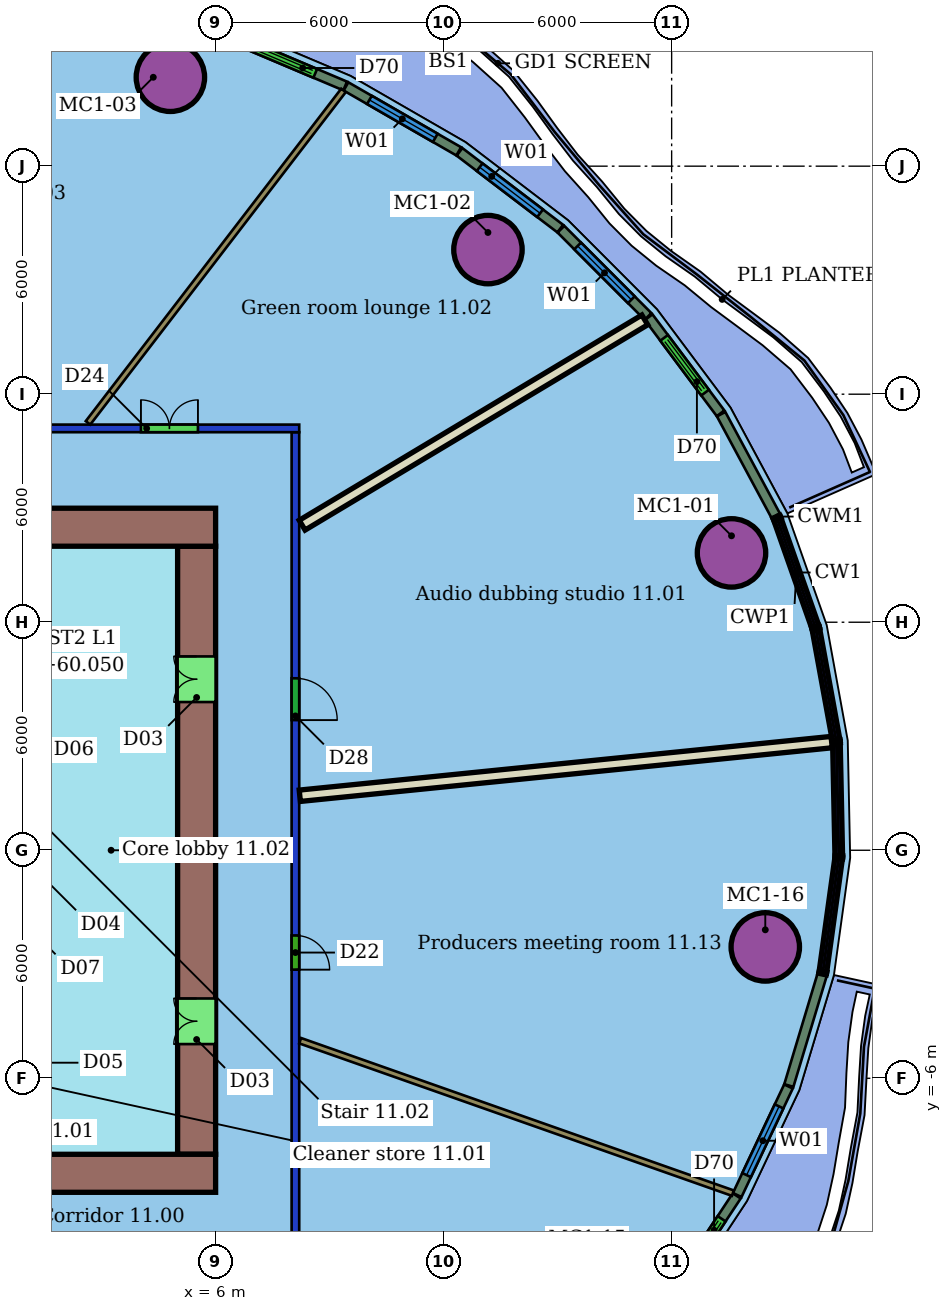
"""IFC4 building model, lengths in metres.
Left out: names, types, materials, properties, quantities, classifications, styles, units other than length and angle.
Written with IfcOpenShell. Run it as: python <this file> out.ifc"""

import sys

from ifc_helpers import new_model, si_unit, direction, frame, frame_2d, origin, origin_2d, place, context, subcontext, project, spatial, rectangle, hollow_circle, extrude, element, fill, save


model = new_model("IFC4")
c1 = context("Model", 3, precision=1e-05, world=origin(), true_north=direction((0.0, 1.0)))
c2 = subcontext(c1, "Body", "Model", "MODEL_VIEW")
j1 = project(units=[si_unit("LENGTHUNIT", "METRE"), si_unit("PLANEANGLEUNIT", "RADIAN")], contexts=[c1])
p1 = place(None, origin())
s1 = spatial("IfcSite", under=j1, at=p1, CompositionType="ELEMENT")
p2 = place(p1, origin())
s2 = spatial("IfcBuilding", under=s1, at=p2, CompositionType="ELEMENT")
p3 = place(p2, frame((0.0, 0.0, 58.2)))
s3 = spatial("IfcBuildingStorey", under=s2, at=p3, CompositionType="ELEMENT", Elevation=58.2)
for number, where, z_axis, x_axis in (
    (1, (19.575, 7.824, 0.0), (0.0, 0.0, 1.0), (1.0, 0.0, 0.0)),
    (2, (13.166, 15.805, 0.0), (0.0, 0.0, 1.0), (1.0, 0.0, 0.0)),
    (3, (4.81, 20.339, 0.0), (0.0, 0.0, 1.0), (1.0, 0.0, 0.0)),
    (4, (20.464, -2.543, 0.0), (0.0, 0.0, 1.0), (1.0, 0.0, 0.0)),
):
    element("IfcColumn", number, at=place(p3, frame(where, z_axis=z_axis, x_axis=x_axis)), inside=s3, PredefinedType="COLUMN", context=c2, shape_type="SweptSolid", body=[
        extrude(hollow_circle(Radius=0.9, WallThickness=0.06, at=origin_2d()), origin(), (0.0, 0.0, 1.0), 3.55),
    ])
p4 = place(p3, frame((-20.2, 11.1, 0.0), z_axis=(0.0, 0.0, 1.0), x_axis=(1.0, 0.0, 0.0)))
e5 = element("IfcWall", 5, at=p4, inside=s3, PredefinedType="PARTITIONING", context=c2, shape_type="SweptSolid", body=[
    extrude(rectangle(XDim=28.4, YDim=0.2, at=frame_2d((14.2, 0.0))), origin(), (0.0, 0.0, 1.0), 2.85),
])
p5 = place(p4, frame((24.235, 0.0, 0.0)))
e6 = element("IfcOpeningElement", 6, at=p5, cuts=e5, PredefinedType="OPENING", context=c2, shape_type="SweptSolid", body=[
    extrude(rectangle(XDim=1.5, YDim=2.1, at=frame_2d((0.75, 1.05))), frame((0.0, 0.11, 0.0), z_axis=(0.0, -1.0, 0.0), x_axis=(1.0, 0.0, 0.0)), (0.0, 0.0, 1.0), 0.22),
])
p6 = place(p4, frame((18.986, 0.0, 0.0)))
e7 = element("IfcOpeningElement", 7, at=p6, cuts=e5, PredefinedType="OPENING", context=c2, shape_type="SweptSolid", body=[
    extrude(rectangle(XDim=1.0, YDim=2.1, at=frame_2d((0.5, 1.05))), frame((0.0, 0.11, 0.0), z_axis=(0.0, -1.0, 0.0), x_axis=(1.0, 0.0, 0.0)), (0.0, 0.0, 1.0), 0.22),
])
p7 = place(p4, frame((10.215, 0.0, 0.0)))
e8 = element("IfcOpeningElement", 8, at=p7, cuts=e5, PredefinedType="OPENING", context=c2, shape_type="SweptSolid", body=[
    extrude(rectangle(XDim=1.2, YDim=2.1, at=frame_2d((0.6, 1.05))), frame((0.0, 0.11, 0.0), z_axis=(0.0, -1.0, 0.0), x_axis=(1.0, 0.0, 0.0)), (0.0, 0.0, 1.0), 0.22),
])
p8 = place(p4, frame((5.94, 0.0, 0.0)))
e9 = element("IfcOpeningElement", 9, at=p8, cuts=e5, PredefinedType="OPENING", context=c2, shape_type="SweptSolid", body=[
    extrude(rectangle(XDim=1.0, YDim=2.1, at=frame_2d((0.5, 1.05))), frame((0.0, 0.11, 0.0), z_axis=(0.0, -1.0, 0.0), x_axis=(1.0, 0.0, 0.0)), (0.0, 0.0, 1.0), 0.22),
])
p9 = place(p3, frame((8.1, 11.0, 0.0), z_axis=(0.0, 0.0, 1.0), x_axis=(0.0, -1.0, 0.0)))
e10 = element("IfcWall", 10, at=p9, inside=s3, PredefinedType="PARTITIONING", context=c2, shape_type="SweptSolid", body=[
    extrude(rectangle(XDim=22.0, YDim=0.2, at=frame_2d((11.0, 0.0))), origin(), (0.0, 0.0, 1.0), 2.85),
])
p10 = place(p9, frame((6.475, 0.0, 0.0)))
e11 = element("IfcOpeningElement", 11, at=p10, cuts=e10, PredefinedType="OPENING", context=c2, shape_type="SweptSolid", body=[
    extrude(rectangle(XDim=1.1, YDim=2.1, at=frame_2d((0.55, 1.05))), frame((0.0, 0.11, 0.0), z_axis=(0.0, -1.0, 0.0), x_axis=(1.0, 0.0, 0.0)), (0.0, 0.0, 1.0), 0.22),
])
p11 = place(p9, frame((13.242, 0.0, 0.0)))
e12 = element("IfcOpeningElement", 12, at=p11, cuts=e10, PredefinedType="OPENING", context=c2, shape_type="SweptSolid", body=[
    extrude(rectangle(XDim=0.9, YDim=2.1, at=frame_2d((0.45, 1.05))), frame((0.0, 0.11, 0.0), z_axis=(0.0, -1.0, 0.0), x_axis=(1.0, 0.0, 0.0)), (0.0, 0.0, 1.0), 0.22),
])
p12 = place(p3, frame((22.211, 2.846, 0.0), z_axis=(0.0, 0.0, 1.0), x_axis=(-0.994950554793, -0.10036629672, 0.0)))
e13 = element("IfcWall", 13, at=p12, inside=s3, PredefinedType="PARTITIONING", context=c2, shape_type="SweptSolid", body=[
    extrude(rectangle(XDim=14.067, YDim=0.3, at=frame_2d((7.034, 0.0))), origin(), (0.0, 0.0, 1.0), 3.55),
])
p13 = place(p3, frame((17.293, 13.955, 0.0), z_axis=(0.0, 0.0, 1.0), x_axis=(-0.857841161712, -0.513914916375, 0.0)))
e14 = element("IfcWall", 14, at=p13, inside=s3, PredefinedType="PARTITIONING", context=c2, shape_type="SweptSolid", body=[
    extrude(rectangle(XDim=10.51, YDim=0.3, at=frame_2d((5.255, 0.0))), origin(), (0.0, 0.0, 1.0), 3.55),
])
p14 = place(p3, frame((9.365, 19.993, 0.0), z_axis=(0.0, 0.0, 1.0), x_axis=(-0.609349200428, -0.792901981293, 0.0)))
e15 = element("IfcWall", 15, at=p14, inside=s3, PredefinedType="PARTITIONING", context=c2, shape_type="SweptSolid", body=[
    extrude(rectangle(XDim=11.032, YDim=0.15, at=frame_2d((5.516, 0.0))), origin(), (0.0, 0.0, 1.0), 3.55),
])
p15 = place(p3, frame((19.611, -9.022, 0.0), z_axis=(0.0, 0.0, 1.0), x_axis=(-0.943187678435, 0.332260444904, 0.0)))
e16 = element("IfcWall", 16, at=p15, inside=s3, PredefinedType="PARTITIONING", context=c2, shape_type="SweptSolid", body=[
    extrude(rectangle(XDim=12.072, YDim=0.15, at=frame_2d((6.036, 0.0))), origin(), (0.0, 0.0, 1.0), 3.55),
])
p16 = place(p3, frame((20.745, 8.79, 0.0), z_axis=(0.0, 0.0, 1.0), x_axis=(-0.473545649415, 0.880769276213, 0.0)))
e17 = element("IfcWall", 17, at=p16, inside=s3, PredefinedType="SOLIDWALL", context=c2, shape_type="SweptSolid", body=[
    extrude(rectangle(XDim=3.048, YDim=0.25, at=frame_2d((1.524, 0.0))), origin(), (0.0, 0.0, 1.0), 3.15),
])
p17 = place(p3, frame((19.288, 11.497, 0.0), z_axis=(0.0, 0.0, 1.0), x_axis=(-0.59907224047, 0.800694979813, 0.0)))
e18 = element("IfcWall", 18, at=p17, inside=s3, PredefinedType="SOLIDWALL", context=c2, shape_type="SweptSolid", body=[
    extrude(rectangle(XDim=3.159, YDim=0.25, at=frame_2d((1.58, 0.0))), origin(), (0.0, 0.0, 1.0), 3.15),
])
p18 = place(p17, frame((0.68, 0.0, 0.0)))
e19 = element("IfcOpeningElement", 19, at=p18, cuts=e18, PredefinedType="OPENING", context=c2, shape_type="SweptSolid", body=[
    extrude(rectangle(XDim=1.8, YDim=2.4, at=frame_2d((0.9, 1.2))), frame((0.0, 0.135, 0.0), z_axis=(0.0, -1.0, 0.0), x_axis=(1.0, 0.0, 0.0)), (0.0, 0.0, 1.0), 0.27),
])
p19 = place(p3, frame((17.378, 14.046, 0.0), z_axis=(0.0, 0.0, 1.0), x_axis=(-0.706541864319, 0.707671247095, 0.0)))
e20 = element("IfcWall", 20, at=p19, inside=s3, PredefinedType="SOLIDWALL", context=c2, shape_type="SweptSolid", body=[
    extrude(rectangle(XDim=3.243, YDim=0.25, at=frame_2d((1.621, 0.0))), origin(), (0.0, 0.0, 1.0), 3.15),
])
p20 = place(p19, frame((0.621, 0.0, 0.8)))
e21 = element("IfcOpeningElement", 21, at=p20, cuts=e20, PredefinedType="OPENING", context=c2, shape_type="SweptSolid", body=[
    extrude(rectangle(XDim=2.0, YDim=2.2, at=frame_2d((1.0, 1.1))), frame((0.0, 0.135, 0.0), z_axis=(0.0, -1.0, 0.0), x_axis=(1.0, 0.0, 0.0)), (0.0, 0.0, 1.0), 0.27),
])
p21 = place(p3, frame((15.069, 16.357, 0.0), z_axis=(0.0, 0.0, 1.0), x_axis=(-0.795504012695, 0.605948319402, 0.0)))
e22 = element("IfcWall", 22, at=p21, inside=s3, PredefinedType="SOLIDWALL", context=c2, shape_type="SweptSolid", body=[
    extrude(rectangle(XDim=3.333, YDim=0.25, at=frame_2d((1.667, 0.0))), origin(), (0.0, 0.0, 1.0), 3.15),
])
p22 = place(p21, frame((0.667, 0.0, 0.8)))
e23 = element("IfcOpeningElement", 23, at=p22, cuts=e22, PredefinedType="OPENING", context=c2, shape_type="SweptSolid", body=[
    extrude(rectangle(XDim=2.0, YDim=2.2, at=frame_2d((1.0, 1.1))), frame((0.0, 0.135, 0.0), z_axis=(0.0, -1.0, 0.0), x_axis=(1.0, 0.0, 0.0)), (0.0, 0.0, 1.0), 0.27),
])
p23 = place(p3, frame((12.397, 18.39, 0.0), z_axis=(0.0, 0.0, 1.0), x_axis=(-0.866535553406, 0.499115352081, 0.0)))
e24 = element("IfcWall", 24, at=p23, inside=s3, PredefinedType="SOLIDWALL", context=c2, shape_type="SweptSolid", body=[
    extrude(rectangle(XDim=3.424, YDim=0.25, at=frame_2d((1.712, 0.0))), origin(), (0.0, 0.0, 1.0), 3.15),
])
p24 = place(p23, frame((0.712, 0.0, 0.8)))
e25 = element("IfcOpeningElement", 25, at=p24, cuts=e24, PredefinedType="OPENING", context=c2, shape_type="SweptSolid", body=[
    extrude(rectangle(XDim=2.0, YDim=2.2, at=frame_2d((1.0, 1.1))), frame((0.0, 0.135, 0.0), z_axis=(0.0, -1.0, 0.0), x_axis=(1.0, 0.0, 0.0)), (0.0, 0.0, 1.0), 0.27),
])
p25 = place(p3, frame((9.409, 20.109, 0.0), z_axis=(0.0, 0.0, 1.0), x_axis=(-0.920920201112, 0.389751181119, 0.0)))
e26 = element("IfcWall", 26, at=p25, inside=s3, PredefinedType="SOLIDWALL", context=c2, shape_type="SweptSolid", body=[
    extrude(rectangle(XDim=3.51, YDim=0.25, at=frame_2d((1.755, 0.0))), origin(), (0.0, 0.0, 1.0), 3.15),
])
p26 = place(p25, frame((0.855, 0.0, 0.0)))
e27 = element("IfcOpeningElement", 27, at=p26, cuts=e26, PredefinedType="OPENING", context=c2, shape_type="SweptSolid", body=[
    extrude(rectangle(XDim=1.8, YDim=2.4, at=frame_2d((0.9, 1.2))), frame((0.0, 0.135, 0.0), z_axis=(0.0, -1.0, 0.0), x_axis=(1.0, 0.0, 0.0)), (0.0, 0.0, 1.0), 0.27),
])
p27 = place(p3, frame((17.926, -11.8, 0.0), z_axis=(0.0, 0.0, 1.0), x_axis=(0.550976461362, 0.834520784058, 0.0)))
e28 = element("IfcWall", 28, at=p27, inside=s3, PredefinedType="SOLIDWALL", context=c2, shape_type="SweptSolid", body=[
    extrude(rectangle(XDim=3.243, YDim=0.25, at=frame_2d((1.621, 0.0))), origin(), (0.0, 0.0, 1.0), 3.15),
])
p28 = place(p27, frame((0.721, 0.0, 0.0)))
e29 = element("IfcOpeningElement", 29, at=p28, cuts=e28, PredefinedType="OPENING", context=c2, shape_type="SweptSolid", body=[
    extrude(rectangle(XDim=1.8, YDim=2.4, at=frame_2d((0.9, 1.2))), frame((0.0, 0.135, 0.0), z_axis=(0.0, -1.0, 0.0), x_axis=(1.0, 0.0, 0.0)), (0.0, 0.0, 1.0), 0.27),
])
p29 = place(p3, frame((19.725, -9.072, 0.0), z_axis=(0.0, 0.0, 1.0), x_axis=(0.427069496555, 0.904218803781, 0.0)))
e30 = element("IfcWall", 30, at=p29, inside=s3, PredefinedType="SOLIDWALL", context=c2, shape_type="SweptSolid", body=[
    extrude(rectangle(XDim=3.159, YDim=0.25, at=frame_2d((1.58, 0.0))), origin(), (0.0, 0.0, 1.0), 3.15),
])
p30 = place(p29, frame((0.58, 0.0, 0.8)))
e31 = element("IfcOpeningElement", 31, at=p30, cuts=e30, PredefinedType="OPENING", context=c2, shape_type="SweptSolid", body=[
    extrude(rectangle(XDim=2.0, YDim=2.2, at=frame_2d((1.0, 1.1))), frame((0.0, 0.135, 0.0), z_axis=(0.0, -1.0, 0.0), x_axis=(1.0, 0.0, 0.0)), (0.0, 0.0, 1.0), 0.27),
])
p31 = place(p3, frame((21.084, -6.19, 0.0), z_axis=(0.0, 0.0, 1.0), x_axis=(0.28804594388, 0.957616590403, 0.0)))
e32 = element("IfcWall", 32, at=p31, inside=s3, PredefinedType="SOLIDWALL", context=c2, shape_type="SweptSolid", body=[
    extrude(rectangle(XDim=3.048, YDim=0.25, at=frame_2d((1.524, 0.0))), origin(), (0.0, 0.0, 1.0), 3.15),
])
p32 = place(p3, frame((6.0, 8.5, 0.0), z_axis=(0.0, 0.0, 1.0), x_axis=(-1.0, 0.0, 0.0)))
e33 = element("IfcWall", 33, at=p32, inside=s3, PredefinedType="SHEAR", context=c2, shape_type="SweptSolid", body=[
    extrude(rectangle(XDim=12.0, YDim=1.0, at=frame_2d((6.0, 0.0))), origin(), (0.0, 0.0, 1.0), 3.4),
])
p33 = place(p32, frame((5.6, 0.0, 0.0)))
e34 = element("IfcOpeningElement", 34, at=p33, cuts=e33, PredefinedType="OPENING", context=c2, shape_type="SweptSolid", body=[
    extrude(rectangle(XDim=1.2, YDim=2.1, at=frame_2d((0.6, 1.05))), frame((0.0, 0.51, 0.0), z_axis=(0.0, -1.0, 0.0), x_axis=(1.0, 0.0, 0.0)), (0.0, 0.0, 1.0), 1.02),
])
p34 = place(p3, frame((-18.0, -8.5, 0.0), z_axis=(0.0, 0.0, 1.0), x_axis=(1.0, 0.0, 0.0)))
e35 = element("IfcWall", 35, at=p34, inside=s3, PredefinedType="SHEAR", context=c2, shape_type="SweptSolid", body=[
    extrude(rectangle(XDim=24.0, YDim=1.0, at=frame_2d((12.0, 0.0))), origin(), (0.0, 0.0, 1.0), 3.4),
])
p35 = place(p34, frame((6.0, 0.0, 0.0)))
e36 = element("IfcOpeningElement", 36, at=p35, cuts=e35, PredefinedType="OPENING", context=c2, shape_type="SweptSolid", body=[
    extrude(rectangle(XDim=1.2, YDim=2.1, at=frame_2d((0.6, 1.05))), frame((0.0, 0.51, 0.0), z_axis=(0.0, -1.0, 0.0), x_axis=(1.0, 0.0, 0.0)), (0.0, 0.0, 1.0), 1.02),
])
p36 = place(p3, frame((5.5, -8.0, 0.0), z_axis=(0.0, 0.0, 1.0), x_axis=(0.0, 1.0, 0.0)))
e37 = element("IfcWall", 37, at=p36, inside=s3, PredefinedType="SHEAR", context=c2, shape_type="SweptSolid", body=[
    extrude(rectangle(XDim=16.0, YDim=1.0, at=frame_2d((8.0, 0.0))), origin(), (0.0, 0.0, 1.0), 3.4),
])
p37 = place(p36, frame((2.9, 0.0, 0.0)))
e38 = element("IfcOpeningElement", 38, at=p37, cuts=e37, PredefinedType="OPENING", context=c2, shape_type="SweptSolid", body=[
    extrude(rectangle(XDim=1.2, YDim=2.1, at=frame_2d((0.6, 1.05))), frame((0.0, 0.51, 0.0), z_axis=(0.0, -1.0, 0.0), x_axis=(1.0, 0.0, 0.0)), (0.0, 0.0, 1.0), 1.02),
])
p38 = place(p36, frame((11.9, 0.0, 0.0)))
e39 = element("IfcOpeningElement", 39, at=p38, cuts=e37, PredefinedType="OPENING", context=c2, shape_type="SweptSolid", body=[
    extrude(rectangle(XDim=1.2, YDim=2.1, at=frame_2d((0.6, 1.05))), frame((0.0, 0.51, 0.0), z_axis=(0.0, -1.0, 0.0), x_axis=(1.0, 0.0, 0.0)), (0.0, 0.0, 1.0), 1.02),
])
p39 = place(p10, origin())
e40 = element("IfcDoor", 40, at=p39, inside=s3, OperationType="SINGLE_SWING_RIGHT", PredefinedType="DOOR", context=c2, shape_type="SweptSolid", body=[
    extrude(rectangle(XDim=1.1, YDim=2.1, at=frame_2d((0.55, 1.05))), frame((0.0, 0.025, 0.0), z_axis=(0.0, -1.0, 0.0), x_axis=(1.0, 0.0, 0.0)), (0.0, 0.0, 1.0), 0.05),
])
fill(e11, e40)
p40 = place(p5, origin())
e41 = element("IfcDoor", 41, at=p40, inside=s3, OperationType="DOUBLE_DOOR_SINGLE_SWING", PredefinedType="DOOR", context=c2, shape_type="SweptSolid", body=[
    extrude(rectangle(XDim=1.5, YDim=2.1, at=frame_2d((0.75, 1.05))), frame((0.0, 0.025, 0.0), z_axis=(0.0, -1.0, 0.0), x_axis=(1.0, 0.0, 0.0)), (0.0, 0.0, 1.0), 0.05),
])
fill(e6, e41)
p41 = place(p11, origin())
e42 = element("IfcDoor", 42, at=p41, inside=s3, OperationType="SINGLE_SWING_RIGHT", PredefinedType="DOOR", context=c2, shape_type="SweptSolid", body=[
    extrude(rectangle(XDim=0.9, YDim=2.1, at=frame_2d((0.45, 1.05))), frame((0.0, 0.025, 0.0), z_axis=(0.0, -1.0, 0.0), x_axis=(1.0, 0.0, 0.0)), (0.0, 0.0, 1.0), 0.05),
])
fill(e12, e42)
p42 = place(p18, origin())
e43 = element("IfcDoor", 43, at=p42, inside=s3, OperationType="DOUBLE_DOOR_SLIDING", PredefinedType="DOOR", context=c2, shape_type="SweptSolid", body=[
    extrude(rectangle(XDim=1.8, YDim=2.4, at=frame_2d((0.9, 1.2))), frame((0.0, 0.025, 0.0), z_axis=(0.0, -1.0, 0.0), x_axis=(1.0, 0.0, 0.0)), (0.0, 0.0, 1.0), 0.05),
])
fill(e19, e43)
p43 = place(p20, origin())
e44 = element("IfcWindow", 44, at=p43, inside=s3, PartitioningType="SINGLE_PANEL", PredefinedType="WINDOW", context=c2, shape_type="SweptSolid", body=[
    extrude(rectangle(XDim=2.0, YDim=2.2, at=frame_2d((1.0, 1.1))), frame((0.0, 0.03, 0.0), z_axis=(0.0, -1.0, 0.0), x_axis=(1.0, 0.0, 0.0)), (0.0, 0.0, 1.0), 0.06),
])
fill(e21, e44)
p44 = place(p22, origin())
e45 = element("IfcWindow", 45, at=p44, inside=s3, PartitioningType="SINGLE_PANEL", PredefinedType="WINDOW", context=c2, shape_type="SweptSolid", body=[
    extrude(rectangle(XDim=2.0, YDim=2.2, at=frame_2d((1.0, 1.1))), frame((0.0, 0.03, 0.0), z_axis=(0.0, -1.0, 0.0), x_axis=(1.0, 0.0, 0.0)), (0.0, 0.0, 1.0), 0.06),
])
fill(e23, e45)
p45 = place(p24, origin())
e46 = element("IfcWindow", 46, at=p45, inside=s3, PartitioningType="SINGLE_PANEL", PredefinedType="WINDOW", context=c2, shape_type="SweptSolid", body=[
    extrude(rectangle(XDim=2.0, YDim=2.2, at=frame_2d((1.0, 1.1))), frame((0.0, 0.03, 0.0), z_axis=(0.0, -1.0, 0.0), x_axis=(1.0, 0.0, 0.0)), (0.0, 0.0, 1.0), 0.06),
])
fill(e25, e46)
p46 = place(p26, origin())
e47 = element("IfcDoor", 47, at=p46, inside=s3, OperationType="DOUBLE_DOOR_SLIDING", PredefinedType="DOOR", context=c2, shape_type="SweptSolid", body=[
    extrude(rectangle(XDim=1.8, YDim=2.4, at=frame_2d((0.9, 1.2))), frame((0.0, 0.025, 0.0), z_axis=(0.0, -1.0, 0.0), x_axis=(1.0, 0.0, 0.0)), (0.0, 0.0, 1.0), 0.05),
])
fill(e27, e47)
p47 = place(p28, origin())
e48 = element("IfcDoor", 48, at=p47, inside=s3, OperationType="DOUBLE_DOOR_SLIDING", PredefinedType="DOOR", context=c2, shape_type="SweptSolid", body=[
    extrude(rectangle(XDim=1.8, YDim=2.4, at=frame_2d((0.9, 1.2))), frame((0.0, 0.025, 0.0), z_axis=(0.0, -1.0, 0.0), x_axis=(1.0, 0.0, 0.0)), (0.0, 0.0, 1.0), 0.05),
])
fill(e29, e48)
p48 = place(p30, origin())
e49 = element("IfcWindow", 49, at=p48, inside=s3, PartitioningType="SINGLE_PANEL", PredefinedType="WINDOW", context=c2, shape_type="SweptSolid", body=[
    extrude(rectangle(XDim=2.0, YDim=2.2, at=frame_2d((1.0, 1.1))), frame((0.0, 0.03, 0.0), z_axis=(0.0, -1.0, 0.0), x_axis=(1.0, 0.0, 0.0)), (0.0, 0.0, 1.0), 0.06),
])
fill(e31, e49)
p49 = place(p37, origin())
e50 = element("IfcDoor", 50, at=p49, inside=s3, OperationType="DOUBLE_DOOR_SINGLE_SWING", PredefinedType="NOTDEFINED", context=c2, shape_type="SweptSolid", body=[
    extrude(rectangle(XDim=1.2, YDim=2.1, at=frame_2d((0.6, 1.05))), frame((0.0, 0.025, 0.0), z_axis=(0.0, -1.0, 0.0), x_axis=(1.0, 0.0, 0.0)), (0.0, 0.0, 1.0), 0.05),
])
fill(e38, e50)
p50 = place(p38, origin())
e51 = element("IfcDoor", 51, at=p50, inside=s3, OperationType="DOUBLE_DOOR_SINGLE_SWING", PredefinedType="NOTDEFINED", context=c2, shape_type="SweptSolid", body=[
    extrude(rectangle(XDim=1.2, YDim=2.1, at=frame_2d((0.6, 1.05))), frame((0.0, 0.025, 0.0), z_axis=(0.0, -1.0, 0.0), x_axis=(1.0, 0.0, 0.0)), (0.0, 0.0, 1.0), 0.05),
])
fill(e39, e51)
save(model, sys.argv[1])
